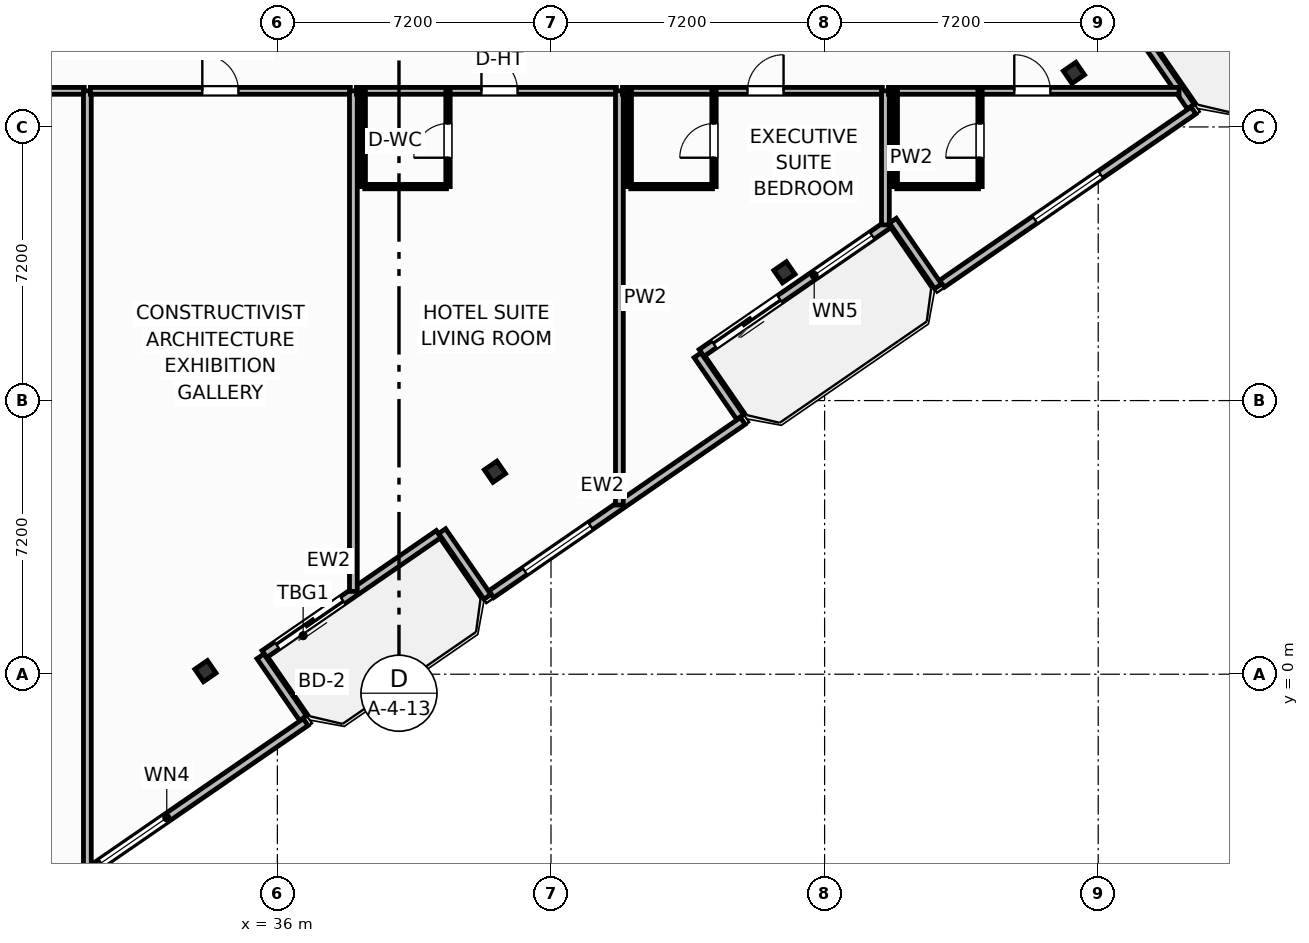
"""IFC4 building model, lengths in metres.
Left out: names, types, materials, properties, quantities, classifications, styles, units other than length and angle.
Written with IfcOpenShell. Run it as: python <this file> out.ifc"""

import sys

from ifc_helpers import new_model, si_unit, direction, frame, frame_2d, origin, origin_2d, place, context, subcontext, project, spatial, rectangle, i_section, extrude, element, fill, save


model = new_model("IFC4")
c1 = context("Model", 3, precision=1e-05, world=origin(), true_north=direction((0.0, 1.0)))
c2 = subcontext(c1, "Body", "Model", "MODEL_VIEW")
j1 = project(units=[si_unit("LENGTHUNIT", "METRE"), si_unit("PLANEANGLEUNIT", "RADIAN")], contexts=[c1])
p1 = place(None, origin())
s1 = spatial("IfcSite", under=j1, at=p1, CompositionType="ELEMENT")
p2 = place(p1, origin())
s2 = spatial("IfcBuilding", under=s1, at=p2, CompositionType="ELEMENT")
p3 = place(p2, frame((0.0, 0.0, 258.2)))
s3 = spatial("IfcBuildingStorey", under=s2, at=p3, CompositionType="ELEMENT", Elevation=258.2)
for number, where, z_axis, x_axis in (
    (1, (34.107, 0.081, 0.0), (0.0, 0.0, 1.0), (0.824, 0.567, 0.0)),
    (2, (41.725, 5.328, 0.0), (0.0, 0.0, 1.0), (0.824, 0.567, 0.0)),
    (3, (49.343, 10.575, 0.0), (0.0, 0.0, 1.0), (0.824, 0.567, 0.0)),
    (4, (56.96, 15.823, 0.0), (0.0, 0.0, 1.0), (0.824, 0.567, 0.0)),
):
    element("IfcColumn", number, at=place(p3, frame(where, z_axis=z_axis, x_axis=x_axis)), inside=s3, PredefinedType="COLUMN", context=c2, shape_type="SweptSolid", body=[
        extrude(i_section(OverallWidth=0.401, OverallDepth=0.399, WebThickness=0.025, FlangeThickness=0.04, FilletRadius=0.022, at=origin_2d()), origin(), (0.0, 0.0, 1.0), 3.7),
    ])
p4 = place(p3, frame((40.244, 3.688, 0.0), z_axis=(0.0, 0.0, 1.0), x_axis=(-0.823541290762, -0.567256328665, 0.0)))
e5 = element("IfcWall", 5, at=p4, inside=s3, PredefinedType="SOLIDWALL", context=c2, shape_type="SweptSolid", body=[
    extrude(rectangle(XDim=5.567, YDim=0.22, at=frame_2d((2.784, 0.0))), origin(), (0.0, 0.0, 1.0), 2.73),
])
p5 = place(p4, frame((3.067, 0.0, 0.0)))
e6 = element("IfcOpeningElement", 6, at=p5, cuts=e5, PredefinedType="OPENING", context=c2, shape_type="SweptSolid", body=[
    extrude(rectangle(XDim=2.1, YDim=2.3, at=frame_2d((1.05, 1.15))), frame((0.0, 0.12, 0.0), z_axis=(0.0, -1.0, 0.0), x_axis=(1.0, 0.0, 0.0)), (0.0, 0.0, 1.0), 0.24),
])
p6 = place(p3, frame((52.103, 11.857, 0.0), z_axis=(0.0, 0.0, 1.0), x_axis=(-0.823534636215, -0.567265989598, 0.0)))
e7 = element("IfcWall", 7, at=p6, inside=s3, PredefinedType="SOLIDWALL", context=c2, shape_type="SweptSolid", body=[
    extrude(rectangle(XDim=6.0, YDim=0.22, at=frame_2d((3.0, 0.0))), origin(), (0.0, 0.0, 1.0), 2.73),
])
p7 = place(p6, frame((3.5, 0.0, 0.0)))
e8 = element("IfcOpeningElement", 8, at=p7, cuts=e7, PredefinedType="OPENING", context=c2, shape_type="SweptSolid", body=[
    extrude(rectangle(XDim=2.1, YDim=2.3, at=frame_2d((1.05, 1.15))), frame((0.0, 0.12, 0.0), z_axis=(0.0, -1.0, 0.0), x_axis=(1.0, 0.0, 0.0)), (0.0, 0.0, 1.0), 0.24),
])
p8 = place(p6, frame((0.55, 0.0, 0.75)))
e9 = element("IfcOpeningElement", 9, at=p8, cuts=e7, PredefinedType="OPENING", context=c2, shape_type="SweptSolid", body=[
    extrude(rectangle(XDim=1.85, YDim=1.75, at=frame_2d((0.925, 0.875))), frame((0.0, 0.12, 0.0), z_axis=(0.0, -1.0, 0.0), x_axis=(1.0, 0.0, 0.0)), (0.0, 0.0, 1.0), 0.24),
])
p9 = place(p3, frame((27.704, -7.488, 0.0), z_axis=(0.0, 0.0, 1.0), x_axis=(0.823529068157, 0.567274073003, 0.0)))
e10 = element("IfcWall", 10, at=p9, inside=s3, PredefinedType="SOLIDWALL", context=c2, shape_type="SweptSolid", body=[
    extrude(rectangle(XDim=10.98, YDim=0.22, at=frame_2d((5.49, 0.0))), origin(), (0.0, 0.0, 1.0), 2.73),
])
p10 = place(p9, frame((4.44, 0.0, 0.8)))
e11 = element("IfcOpeningElement", 11, at=p10, cuts=e10, PredefinedType="OPENING", context=c2, shape_type="SweptSolid", body=[
    extrude(rectangle(XDim=2.1, YDim=1.75, at=frame_2d((1.05, 0.875))), frame((0.0, 0.12, 0.0), z_axis=(0.0, -1.0, 0.0), x_axis=(1.0, 0.0, 0.0)), (0.0, 0.0, 1.0), 0.24),
])
p11 = place(p3, frame((36.675, -1.156, 0.0), z_axis=(0.0, 0.0, 1.0), x_axis=(-0.567215821234, 0.823569190865, 0.0)))
e12 = element("IfcWall", 12, at=p11, inside=s3, PredefinedType="SOLIDWALL", context=c2, shape_type="SweptSolid", body=[
    extrude(rectangle(XDim=1.975, YDim=0.22, at=frame_2d((0.988, 0.0))), origin(), (0.0, 0.0, 1.0), 2.73),
])
p12 = place(p3, frame((40.337, 3.765, 0.0), z_axis=(0.0, 0.0, 1.0), x_axis=(0.567352541689, -0.823475010816, 0.0)))
e13 = element("IfcWall", 13, at=p12, inside=s3, PredefinedType="SOLIDWALL", context=c2, shape_type="SweptSolid", body=[
    extrude(rectangle(XDim=2.1, YDim=0.22, at=frame_2d((1.05, 0.0))), origin(), (0.0, 0.0, 1.0), 2.73),
])
p13 = place(p3, frame((41.631, 2.106, 0.0), z_axis=(0.0, 0.0, 1.0), x_axis=(0.823530942962, 0.56727135128, 0.0)))
e14 = element("IfcWall", 14, at=p13, inside=s3, PredefinedType="SOLIDWALL", context=c2, shape_type="SweptSolid", body=[
    extrude(rectangle(XDim=8.035, YDim=0.22, at=frame_2d((4.018, 0.0))), origin(), (0.0, 0.0, 1.0), 2.73),
])
p14 = place(p13, frame((1.068, 0.0, 0.8)))
e15 = element("IfcOpeningElement", 15, at=p14, cuts=e14, PredefinedType="OPENING", context=c2, shape_type="SweptSolid", body=[
    extrude(rectangle(XDim=2.1, YDim=1.75, at=frame_2d((1.05, 0.875))), frame((0.0, 0.12, 0.0), z_axis=(0.0, -1.0, 0.0), x_axis=(1.0, 0.0, 0.0)), (0.0, 0.0, 1.0), 0.24),
])
p15 = place(p3, frame((48.177, 6.767, 0.0), z_axis=(0.0, 0.0, 1.0), x_axis=(-0.567273565974, 0.823529417415, 0.0)))
e16 = element("IfcWall", 16, at=p15, inside=s3, PredefinedType="SOLIDWALL", context=c2, shape_type="SweptSolid", body=[
    extrude(rectangle(XDim=1.975, YDim=0.22, at=frame_2d((0.988, 0.0))), origin(), (0.0, 0.0, 1.0), 2.73),
])
p16 = place(p3, frame((52.196, 11.933, 0.0), z_axis=(0.0, 0.0, 1.0), x_axis=(0.56729822855, -0.823512428494, 0.0)))
e17 = element("IfcWall", 17, at=p16, inside=s3, PredefinedType="SOLIDWALL", context=c2, shape_type="SweptSolid", body=[
    extrude(rectangle(XDim=2.1, YDim=0.22, at=frame_2d((1.05, 0.0))), origin(), (0.0, 0.0, 1.0), 2.73),
])
p17 = place(p3, frame((53.49, 10.275, 0.0), z_axis=(0.0, 0.0, 1.0), x_axis=(0.823530942962, 0.56727135128, 0.0)))
e18 = element("IfcWall", 18, at=p17, inside=s3, PredefinedType="SOLIDWALL", context=c2, shape_type="SweptSolid", body=[
    extrude(rectangle(XDim=8.035, YDim=0.22, at=frame_2d((4.018, 0.0))), origin(), (0.0, 0.0, 1.0), 2.73),
])
p18 = place(p17, frame((2.968, 0.0, 0.8)))
e19 = element("IfcOpeningElement", 19, at=p18, cuts=e18, PredefinedType="OPENING", context=c2, shape_type="SweptSolid", body=[
    extrude(rectangle(XDim=2.1, YDim=1.75, at=frame_2d((1.05, 0.875))), frame((0.0, 0.12, 0.0), z_axis=(0.0, -1.0, 0.0), x_axis=(1.0, 0.0, 0.0)), (0.0, 0.0, 1.0), 0.24),
])
p19 = place(p3, frame((60.036, 14.936, 0.0), z_axis=(0.0, 0.0, 1.0), x_axis=(-0.567273565974, 0.823529417415, 0.0)))
e20 = element("IfcWall", 20, at=p19, inside=s3, PredefinedType="SOLIDWALL", context=c2, shape_type="SweptSolid", body=[
    extrude(rectangle(XDim=1.975, YDim=0.22, at=frame_2d((0.988, 0.0))), origin(), (0.0, 0.0, 1.0), 2.73),
])
p20 = place(p3, frame((24.08, 15.35, 0.0), z_axis=(0.0, 0.0, 1.0), x_axis=(1.0, 0.0, 0.0)))
e21 = element("IfcWall", 21, at=p20, inside=s3, PredefinedType="PARTITIONING", context=c2, shape_type="SweptSolid", body=[
    extrude(rectangle(XDim=6.84, YDim=0.18, at=frame_2d((3.42, 0.0))), origin(), (0.0, 0.0, 1.0), 3.45),
])
p21 = place(p20, frame((2.945, 0.0, 0.0)))
e22 = element("IfcOpeningElement", 22, at=p21, cuts=e21, PredefinedType="OPENING", context=c2, shape_type="SweptSolid", body=[
    extrude(rectangle(XDim=0.95, YDim=2.05, at=frame_2d((0.475, 1.025))), frame((0.0, 0.1, 0.0), z_axis=(0.0, -1.0, 0.0), x_axis=(1.0, 0.0, 0.0)), (0.0, 0.0, 1.0), 0.2),
])
p22 = place(p3, frame((31.0, -5.112, 0.0), z_axis=(0.0, 0.0, 1.0), x_axis=(0.0, 1.0, 0.0)))
e23 = element("IfcWall", 23, at=p22, inside=s3, PredefinedType="PARTITIONING", context=c2, shape_type="SweptSolid", body=[
    extrude(rectangle(XDim=20.462, YDim=0.205, at=frame_2d((10.231, 0.0))), origin(), (0.0, 0.0, 1.0), 3.45),
])
p23 = place(p3, frame((31.08, 15.35, 0.0), z_axis=(0.0, 0.0, 1.0), x_axis=(1.0, 0.0, 0.0)))
e24 = element("IfcWall", 24, at=p23, inside=s3, PredefinedType="PARTITIONING", context=c2, shape_type="SweptSolid", body=[
    extrude(rectangle(XDim=6.84, YDim=0.18, at=frame_2d((3.42, 0.0))), origin(), (0.0, 0.0, 1.0), 3.45),
])
p24 = place(p23, frame((2.945, 0.0, 0.0)))
e25 = element("IfcOpeningElement", 25, at=p24, cuts=e24, PredefinedType="OPENING", context=c2, shape_type="SweptSolid", body=[
    extrude(rectangle(XDim=0.95, YDim=2.05, at=frame_2d((0.475, 1.025))), frame((0.0, 0.1, 0.0), z_axis=(0.0, -1.0, 0.0), x_axis=(1.0, 0.0, 0.0)), (0.0, 0.0, 1.0), 0.2),
])
p25 = place(p3, frame((38.0, 2.179, 0.0), z_axis=(0.0, 0.0, 1.0), x_axis=(0.0, 1.0, 0.0)))
e26 = element("IfcWall", 26, at=p25, inside=s3, PredefinedType="PARTITIONING", context=c2, shape_type="SweptSolid", body=[
    extrude(rectangle(XDim=13.171, YDim=0.205, at=frame_2d((6.585, 0.0))), origin(), (0.0, 0.0, 1.0), 3.45),
])
p26 = place(p3, frame((38.08, 15.35, 0.0), z_axis=(0.0, 0.0, 1.0), x_axis=(1.0, 0.0, 0.0)))
e27 = element("IfcWall", 27, at=p26, inside=s3, PredefinedType="PARTITIONING", context=c2, shape_type="SweptSolid", body=[
    extrude(rectangle(XDim=6.84, YDim=0.18, at=frame_2d((3.42, 0.0))), origin(), (0.0, 0.0, 1.0), 3.45),
])
p27 = place(p26, frame((3.29, 0.0, 0.0)))
e28 = element("IfcOpeningElement", 28, at=p27, cuts=e27, PredefinedType="OPENING", context=c2, shape_type="SweptSolid", body=[
    extrude(rectangle(XDim=0.95, YDim=2.15, at=frame_2d((0.475, 1.075))), frame((0.0, 0.1, 0.0), z_axis=(0.0, -1.0, 0.0), x_axis=(1.0, 0.0, 0.0)), (0.0, 0.0, 1.0), 0.2),
])
p28 = place(p3, frame((38.3, 12.83, 0.0), z_axis=(0.0, 0.0, 1.0), x_axis=(1.0, 0.0, 0.0)))
e29 = element("IfcWall", 29, at=p28, inside=s3, PredefinedType="PARTITIONING", context=c2, shape_type="SweptSolid", body=[
    extrude(rectangle(XDim=2.15, YDim=0.115, at=frame_2d((1.075, 0.0))), origin(), (0.0, 0.0, 1.0), 3.45),
])
p29 = place(p3, frame((40.49, 12.83, 0.0), z_axis=(0.0, 0.0, 1.0), x_axis=(0.0, 1.0, 0.0)))
e30 = element("IfcWall", 30, at=p29, inside=s3, PredefinedType="PARTITIONING", context=c2, shape_type="SweptSolid", body=[
    extrude(rectangle(XDim=2.52, YDim=0.115, at=frame_2d((1.26, 0.0))), origin(), (0.0, 0.0, 1.0), 3.45),
])
p30 = place(p29, frame((0.76, 0.0, 0.0)))
e31 = element("IfcOpeningElement", 31, at=p30, cuts=e30, PredefinedType="OPENING", context=c2, shape_type="SweptSolid", body=[
    extrude(rectangle(XDim=0.9, YDim=2.05, at=frame_2d((0.45, 1.025))), frame((0.0, 0.067, 0.0), z_axis=(0.0, -1.0, 0.0), x_axis=(1.0, 0.0, 0.0)), (0.0, 0.0, 1.0), 0.135),
])
p31 = place(p3, frame((38.26, 12.83, 0.0), z_axis=(0.0, 0.0, 1.0), x_axis=(0.0, 1.0, 0.0)))
e32 = element("IfcWall", 32, at=p31, inside=s3, PredefinedType="PARTITIONING", context=c2, shape_type="SweptSolid", body=[
    extrude(rectangle(XDim=2.52, YDim=0.115, at=frame_2d((1.26, 0.0))), origin(), (0.0, 0.0, 1.0), 3.45),
])
p32 = place(p3, frame((45.0, 4.451, 0.0), z_axis=(0.0, 0.0, 1.0), x_axis=(0.0, 1.0, 0.0)))
e33 = element("IfcWall", 33, at=p32, inside=s3, PredefinedType="PARTITIONING", context=c2, shape_type="SweptSolid", body=[
    extrude(rectangle(XDim=10.899, YDim=0.205, at=frame_2d((5.45, 0.0))), origin(), (0.0, 0.0, 1.0), 3.45),
])
p33 = place(p3, frame((45.08, 15.35, 0.0), z_axis=(0.0, 0.0, 1.0), x_axis=(1.0, 0.0, 0.0)))
e34 = element("IfcWall", 34, at=p33, inside=s3, PredefinedType="PARTITIONING", context=c2, shape_type="SweptSolid", body=[
    extrude(rectangle(XDim=6.84, YDim=0.18, at=frame_2d((3.42, 0.0))), origin(), (0.0, 0.0, 1.0), 3.45),
])
p34 = place(p33, frame((3.29, 0.0, 0.0)))
e35 = element("IfcOpeningElement", 35, at=p34, cuts=e34, PredefinedType="OPENING", context=c2, shape_type="SweptSolid", body=[
    extrude(rectangle(XDim=0.95, YDim=2.15, at=frame_2d((0.475, 1.075))), frame((0.0, 0.1, 0.0), z_axis=(0.0, -1.0, 0.0), x_axis=(1.0, 0.0, 0.0)), (0.0, 0.0, 1.0), 0.2),
])
p35 = place(p3, frame((45.3, 12.83, 0.0), z_axis=(0.0, 0.0, 1.0), x_axis=(1.0, 0.0, 0.0)))
e36 = element("IfcWall", 36, at=p35, inside=s3, PredefinedType="PARTITIONING", context=c2, shape_type="SweptSolid", body=[
    extrude(rectangle(XDim=2.15, YDim=0.115, at=frame_2d((1.075, 0.0))), origin(), (0.0, 0.0, 1.0), 3.018),
])
p36 = place(p3, frame((47.49, 12.83, 0.0), z_axis=(0.0, 0.0, 1.0), x_axis=(0.0, 1.0, 0.0)))
e37 = element("IfcWall", 37, at=p36, inside=s3, PredefinedType="PARTITIONING", context=c2, shape_type="SweptSolid", body=[
    extrude(rectangle(XDim=2.52, YDim=0.115, at=frame_2d((1.26, 0.0))), origin(), (0.0, 0.0, 1.0), 3.45),
])
p37 = place(p36, frame((0.76, 0.0, 0.0)))
e38 = element("IfcOpeningElement", 38, at=p37, cuts=e37, PredefinedType="OPENING", context=c2, shape_type="SweptSolid", body=[
    extrude(rectangle(XDim=0.9, YDim=2.05, at=frame_2d((0.45, 1.025))), frame((0.0, 0.067, 0.0), z_axis=(0.0, -1.0, 0.0), x_axis=(1.0, 0.0, 0.0)), (0.0, 0.0, 1.0), 0.135),
])
p38 = place(p3, frame((45.26, 12.83, 0.0), z_axis=(0.0, 0.0, 1.0), x_axis=(0.0, 1.0, 0.0)))
e39 = element("IfcWall", 39, at=p38, inside=s3, PredefinedType="PARTITIONING", context=c2, shape_type="SweptSolid", body=[
    extrude(rectangle(XDim=2.52, YDim=0.115, at=frame_2d((1.26, 0.0))), origin(), (0.0, 0.0, 1.0), 3.45),
])
p39 = place(p3, frame((52.0, 11.823, 0.0), z_axis=(0.0, 0.0, 1.0), x_axis=(0.0, 1.0, 0.0)))
e40 = element("IfcWall", 40, at=p39, inside=s3, PredefinedType="PARTITIONING", context=c2, shape_type="SweptSolid", body=[
    extrude(rectangle(XDim=3.527, YDim=0.205, at=frame_2d((1.764, 0.0))), origin(), (0.0, 0.0, 1.0), 3.45),
])
p40 = place(p3, frame((52.08, 15.35, 0.0), z_axis=(0.0, 0.0, 1.0), x_axis=(1.0, 0.0, 0.0)))
e41 = element("IfcWall", 41, at=p40, inside=s3, PredefinedType="PARTITIONING", context=c2, shape_type="SweptSolid", body=[
    extrude(rectangle(XDim=7.646, YDim=0.18, at=frame_2d((3.823, 0.0))), origin(), (0.0, 0.0, 1.0), 3.45),
])
p41 = place(p40, frame((3.311, 0.0, 0.0)))
e42 = element("IfcOpeningElement", 42, at=p41, cuts=e41, PredefinedType="OPENING", context=c2, shape_type="SweptSolid", body=[
    extrude(rectangle(XDim=0.95, YDim=2.15, at=frame_2d((0.475, 1.075))), frame((0.0, 0.1, 0.0), z_axis=(0.0, -1.0, 0.0), x_axis=(1.0, 0.0, 0.0)), (0.0, 0.0, 1.0), 0.2),
])
p42 = place(p3, frame((52.3, 12.83, 0.0), z_axis=(0.0, 0.0, 1.0), x_axis=(1.0, 0.0, 0.0)))
e43 = element("IfcWall", 43, at=p42, inside=s3, PredefinedType="PARTITIONING", context=c2, shape_type="SweptSolid", body=[
    extrude(rectangle(XDim=2.15, YDim=0.115, at=frame_2d((1.075, 0.0))), origin(), (0.0, 0.0, 1.0), 3.45),
])
p43 = place(p3, frame((54.49, 12.83, 0.0), z_axis=(0.0, 0.0, 1.0), x_axis=(0.0, 1.0, 0.0)))
e44 = element("IfcWall", 44, at=p43, inside=s3, PredefinedType="PARTITIONING", context=c2, shape_type="SweptSolid", body=[
    extrude(rectangle(XDim=2.52, YDim=0.115, at=frame_2d((1.26, 0.0))), origin(), (0.0, 0.0, 1.0), 3.45),
])
p44 = place(p43, frame((0.76, 0.0, 0.0)))
e45 = element("IfcOpeningElement", 45, at=p44, cuts=e44, PredefinedType="OPENING", context=c2, shape_type="SweptSolid", body=[
    extrude(rectangle(XDim=0.9, YDim=2.05, at=frame_2d((0.45, 1.025))), frame((0.0, 0.067, 0.0), z_axis=(0.0, -1.0, 0.0), x_axis=(1.0, 0.0, 0.0)), (0.0, 0.0, 1.0), 0.135),
])
p45 = place(p3, frame((52.26, 12.83, 0.0), z_axis=(0.0, 0.0, 1.0), x_axis=(0.0, 1.0, 0.0)))
e46 = element("IfcWall", 46, at=p45, inside=s3, PredefinedType="PARTITIONING", context=c2, shape_type="SweptSolid", body=[
    extrude(rectangle(XDim=2.52, YDim=0.115, at=frame_2d((1.26, 0.0))), origin(), (0.0, 0.0, 1.0), 3.45),
])
p46 = place(p5, origin())
e47 = element("IfcDoor", 47, at=p46, inside=s3, OperationType="SLIDING_TO_LEFT", PredefinedType="DOOR", context=c2, shape_type="SweptSolid", body=[
    extrude(rectangle(XDim=2.1, YDim=2.3, at=frame_2d((1.05, 1.15))), frame((0.0, 0.025, 0.0), z_axis=(0.0, -1.0, 0.0), x_axis=(1.0, 0.0, 0.0)), (0.0, 0.0, 1.0), 0.05),
])
fill(e6, e47)
p47 = place(p7, origin())
e48 = element("IfcDoor", 48, at=p47, inside=s3, OperationType="SLIDING_TO_LEFT", PredefinedType="DOOR", context=c2, shape_type="SweptSolid", body=[
    extrude(rectangle(XDim=2.1, YDim=2.3, at=frame_2d((1.05, 1.15))), frame((0.0, 0.025, 0.0), z_axis=(0.0, -1.0, 0.0), x_axis=(1.0, 0.0, 0.0)), (0.0, 0.0, 1.0), 0.05),
])
fill(e8, e48)
p48 = place(p8, origin())
e49 = element("IfcWindow", 49, at=p48, inside=s3, PartitioningType="SINGLE_PANEL", PredefinedType="WINDOW", context=c2, shape_type="SweptSolid", body=[
    extrude(rectangle(XDim=1.85, YDim=1.75, at=frame_2d((0.925, 0.875))), frame((0.0, 0.03, 0.0), z_axis=(0.0, -1.0, 0.0), x_axis=(1.0, 0.0, 0.0)), (0.0, 0.0, 1.0), 0.06),
])
fill(e9, e49)
p49 = place(p10, origin())
e50 = element("IfcWindow", 50, at=p49, inside=s3, PartitioningType="SINGLE_PANEL", PredefinedType="WINDOW", context=c2, shape_type="SweptSolid", body=[
    extrude(rectangle(XDim=2.1, YDim=1.75, at=frame_2d((1.05, 0.875))), frame((0.0, 0.03, 0.0), z_axis=(0.0, -1.0, 0.0), x_axis=(1.0, 0.0, 0.0)), (0.0, 0.0, 1.0), 0.06),
])
fill(e11, e50)
p50 = place(p14, origin())
e51 = element("IfcWindow", 51, at=p50, inside=s3, PartitioningType="SINGLE_PANEL", PredefinedType="WINDOW", context=c2, shape_type="SweptSolid", body=[
    extrude(rectangle(XDim=2.1, YDim=1.75, at=frame_2d((1.05, 0.875))), frame((0.0, 0.03, 0.0), z_axis=(0.0, -1.0, 0.0), x_axis=(1.0, 0.0, 0.0)), (0.0, 0.0, 1.0), 0.06),
])
fill(e15, e51)
p51 = place(p18, origin())
e52 = element("IfcWindow", 52, at=p51, inside=s3, PartitioningType="SINGLE_PANEL", PredefinedType="WINDOW", context=c2, shape_type="SweptSolid", body=[
    extrude(rectangle(XDim=2.1, YDim=1.75, at=frame_2d((1.05, 0.875))), frame((0.0, 0.03, 0.0), z_axis=(0.0, -1.0, 0.0), x_axis=(1.0, 0.0, 0.0)), (0.0, 0.0, 1.0), 0.06),
])
fill(e19, e52)
p52 = place(p24, origin())
e53 = element("IfcDoor", 53, at=p52, inside=s3, OperationType="SINGLE_SWING_LEFT", PredefinedType="DOOR", context=c2, shape_type="SweptSolid", body=[
    extrude(rectangle(XDim=0.95, YDim=2.05, at=frame_2d((0.475, 1.025))), frame((0.0, 0.025, 0.0), z_axis=(0.0, -1.0, 0.0), x_axis=(1.0, 0.0, 0.0)), (0.0, 0.0, 1.0), 0.05),
])
fill(e25, e53)
p53 = place(p27, origin())
e54 = element("IfcDoor", 54, at=p53, inside=s3, OperationType="SINGLE_SWING_LEFT", PredefinedType="DOOR", context=c2, shape_type="SweptSolid", body=[
    extrude(rectangle(XDim=0.95, YDim=2.15, at=frame_2d((0.475, 1.075))), frame((0.0, 0.025, 0.0), z_axis=(0.0, -1.0, 0.0), x_axis=(1.0, 0.0, 0.0)), (0.0, 0.0, 1.0), 0.05),
])
fill(e28, e54)
p54 = place(p30, origin())
e55 = element("IfcDoor", 55, at=p54, inside=s3, OperationType="SINGLE_SWING_LEFT", PredefinedType="DOOR", context=c2, shape_type="SweptSolid", body=[
    extrude(rectangle(XDim=0.9, YDim=2.05, at=frame_2d((0.45, 1.025))), frame((0.0, 0.025, 0.0), z_axis=(0.0, -1.0, 0.0), x_axis=(1.0, 0.0, 0.0)), (0.0, 0.0, 1.0), 0.05),
])
fill(e31, e55)
p55 = place(p34, origin())
e56 = element("IfcDoor", 56, at=p55, inside=s3, OperationType="SINGLE_SWING_RIGHT", PredefinedType="DOOR", context=c2, shape_type="SweptSolid", body=[
    extrude(rectangle(XDim=0.95, YDim=2.15, at=frame_2d((0.475, 1.075))), frame((0.0, 0.025, 0.0), z_axis=(0.0, -1.0, 0.0), x_axis=(1.0, 0.0, 0.0)), (0.0, 0.0, 1.0), 0.05),
])
fill(e35, e56)
p56 = place(p37, origin())
e57 = element("IfcDoor", 57, at=p56, inside=s3, OperationType="SINGLE_SWING_LEFT", PredefinedType="DOOR", context=c2, shape_type="SweptSolid", body=[
    extrude(rectangle(XDim=0.9, YDim=2.05, at=frame_2d((0.45, 1.025))), frame((0.0, 0.025, 0.0), z_axis=(0.0, -1.0, 0.0), x_axis=(1.0, 0.0, 0.0)), (0.0, 0.0, 1.0), 0.05),
])
fill(e38, e57)
p57 = place(p41, origin())
e58 = element("IfcDoor", 58, at=p57, inside=s3, OperationType="SINGLE_SWING_LEFT", PredefinedType="DOOR", context=c2, shape_type="SweptSolid", body=[
    extrude(rectangle(XDim=0.95, YDim=2.15, at=frame_2d((0.475, 1.075))), frame((0.0, 0.025, 0.0), z_axis=(0.0, -1.0, 0.0), x_axis=(1.0, 0.0, 0.0)), (0.0, 0.0, 1.0), 0.05),
])
fill(e42, e58)
p58 = place(p44, origin())
e59 = element("IfcDoor", 59, at=p58, inside=s3, OperationType="SINGLE_SWING_LEFT", PredefinedType="DOOR", context=c2, shape_type="SweptSolid", body=[
    extrude(rectangle(XDim=0.9, YDim=2.05, at=frame_2d((0.45, 1.025))), frame((0.0, 0.025, 0.0), z_axis=(0.0, -1.0, 0.0), x_axis=(1.0, 0.0, 0.0)), (0.0, 0.0, 1.0), 0.05),
])
fill(e45, e59)
save(model, sys.argv[1])
